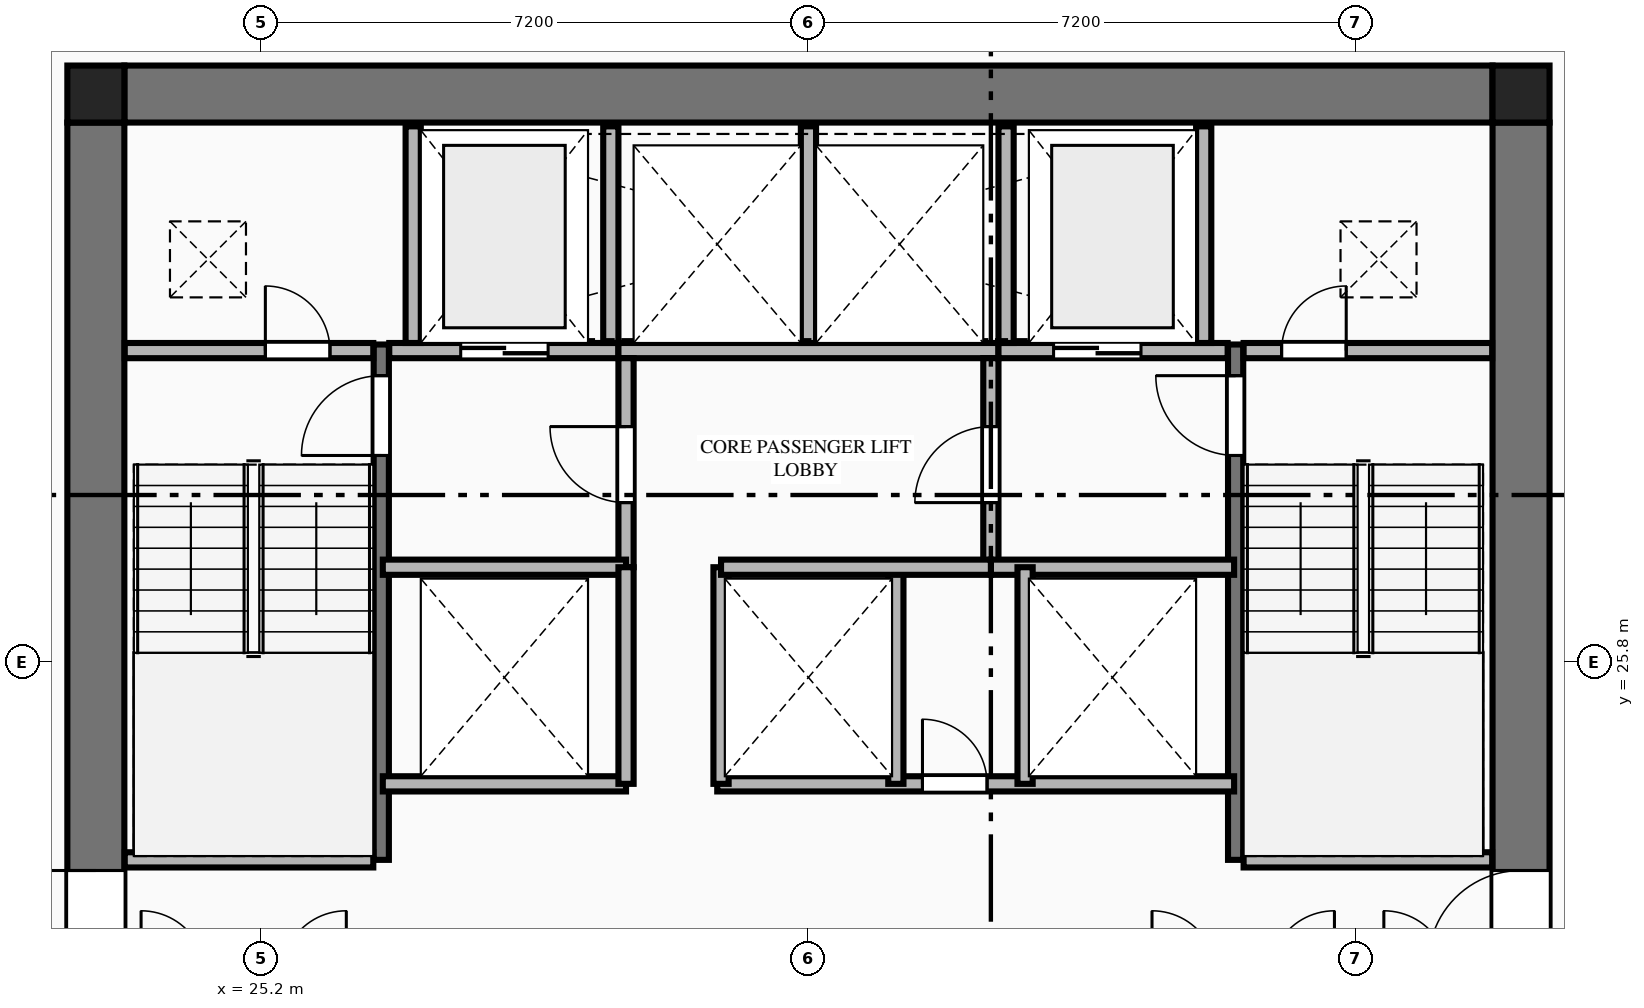
"""IFC4 building model, lengths in metres.
Left out: names, types, materials, properties, quantities, classifications, styles, units other than length and angle.
Written with IfcOpenShell. Run it as: python <this file> out.ifc"""

import sys

from ifc_helpers import new_model, si_unit, direction, frame, frame_2d, origin, origin_2d, place, context, subcontext, project, spatial, rectangle, extrude, element, fill, save


model = new_model("IFC4")
c1 = context("Model", 3, precision=1e-05, world=origin(), true_north=direction((0.0, 1.0)))
c2 = subcontext(c1, "Body", "Model", "MODEL_VIEW")
j1 = project(units=[si_unit("LENGTHUNIT", "METRE"), si_unit("PLANEANGLEUNIT", "RADIAN")], contexts=[c1])
p1 = place(None, origin())
s1 = spatial("IfcSite", under=j1, at=p1, CompositionType="ELEMENT")
p2 = place(p1, origin())
s2 = spatial("IfcBuilding", under=s1, at=p2, CompositionType="ELEMENT")
p3 = place(p2, frame((0.0, 0.0, 90.65)))
s3 = spatial("IfcBuildingStorey", under=s2, at=p3, CompositionType="ELEMENT", Elevation=90.65)
for number, where, z_axis, x_axis in (
    (1, (41.775, 33.275, 0.0), (0.0, 0.0, 1.0), (1.0, 0.0, 0.0)),
    (2, (23.025, 33.275, 0.0), (0.0, 0.0, 1.0), (1.0, 0.0, 0.0)),
):
    element("IfcColumn", number, at=place(p3, frame(where, z_axis=z_axis, x_axis=x_axis)), inside=s3, PredefinedType="COLUMN", context=c2, shape_type="SweptSolid", body=[
        extrude(rectangle(XDim=0.75, YDim=0.75, at=origin_2d()), origin(), (0.0, 0.0, 1.0), 3.55),
    ])
p4 = place(p3, frame((23.4, 33.275, 0.0), z_axis=(0.0, 0.0, 1.0), x_axis=(1.0, 0.0, 0.0)))
e3 = element("IfcWall", 3, at=p4, inside=s3, PredefinedType="SHEAR", context=c2, shape_type="SweptSolid", body=[
    extrude(rectangle(XDim=18.0, YDim=0.75, at=frame_2d((9.0, 0.0))), origin(), (0.0, 0.0, 1.0), 3.33),
])
p5 = place(p3, frame((23.025, 18.9, 0.0), z_axis=(0.0, 0.0, 1.0), x_axis=(0.0, 1.0, 0.0)))
e4 = element("IfcWall", 4, at=p5, inside=s3, PredefinedType="SHEAR", context=c2, shape_type="SweptSolid", body=[
    extrude(rectangle(XDim=14.0, YDim=0.75, at=frame_2d((7.0, 0.0))), origin(), (0.0, 0.0, 1.0), 3.33),
])
p6 = place(p5, frame((2.94, 0.0, 0.0)))
e5 = element("IfcOpeningElement", 5, at=p6, cuts=e4, PredefinedType="OPENING", context=c2, shape_type="SweptSolid", body=[
    extrude(rectangle(XDim=1.22, YDim=2.25, at=frame_2d((0.61, 1.125))), frame((0.0, 0.385, 0.0), z_axis=(0.0, -1.0, 0.0), x_axis=(1.0, 0.0, 0.0)), (0.0, 0.0, 1.0), 0.77),
])
p7 = place(p3, frame((41.775, 18.9, 0.0), z_axis=(0.0, 0.0, 1.0), x_axis=(0.0, 1.0, 0.0)))
e6 = element("IfcWall", 6, at=p7, inside=s3, PredefinedType="SHEAR", context=c2, shape_type="SweptSolid", body=[
    extrude(rectangle(XDim=14.0, YDim=0.75, at=frame_2d((7.0, 0.0))), origin(), (0.0, 0.0, 1.0), 3.33),
])
p8 = place(p7, frame((2.94, 0.0, 0.0)))
e7 = element("IfcOpeningElement", 7, at=p8, cuts=e6, PredefinedType="OPENING", context=c2, shape_type="SweptSolid", body=[
    extrude(rectangle(XDim=1.22, YDim=2.25, at=frame_2d((0.61, 1.125))), frame((0.0, 0.385, 0.0), z_axis=(0.0, -1.0, 0.0), x_axis=(1.0, 0.0, 0.0)), (0.0, 0.0, 1.0), 0.77),
])
p9 = place(p3, frame((26.78, 23.2, 0.0), z_axis=(0.0, 0.0, 1.0), x_axis=(0.0, 1.0, 0.0)))
e8 = element("IfcWall", 8, at=p9, inside=s3, PredefinedType="SHEAR", context=c2, shape_type="SweptSolid", body=[
    extrude(rectangle(XDim=6.78, YDim=0.2, at=frame_2d((3.39, 0.0))), origin(), (0.0, 0.0, 1.0), 3.55),
])
p10 = place(p9, frame((5.32, 0.0, 0.0)))
e9 = element("IfcOpeningElement", 9, at=p10, cuts=e8, PredefinedType="OPENING", context=c2, shape_type="SweptSolid", body=[
    extrude(rectangle(XDim=1.05, YDim=2.15, at=frame_2d((0.525, 1.075))), frame((0.0, 0.11, 0.0), z_axis=(0.0, -1.0, 0.0), x_axis=(1.0, 0.0, 0.0)), (0.0, 0.0, 1.0), 0.22),
])
p11 = place(p3, frame((23.405, 23.2, 0.0), z_axis=(0.0, 0.0, 1.0), x_axis=(1.0, 0.0, 0.0)))
e10 = element("IfcWall", 10, at=p11, inside=s3, PredefinedType="PLUMBINGWALL", context=c2, shape_type="SweptSolid", body=[
    extrude(rectangle(XDim=3.27, YDim=0.2, at=frame_2d((1.635, 0.0))), origin(), (0.0, 0.0, 1.0), 3.33),
])
p12 = place(p3, frame((38.02, 23.2, 0.0), z_axis=(0.0, 0.0, 1.0), x_axis=(0.0, 1.0, 0.0)))
e11 = element("IfcWall", 11, at=p12, inside=s3, PredefinedType="SHEAR", context=c2, shape_type="SweptSolid", body=[
    extrude(rectangle(XDim=6.78, YDim=0.2, at=frame_2d((3.39, 0.0))), origin(), (0.0, 0.0, 1.0), 3.55),
])
p13 = place(p12, frame((5.32, 0.0, 0.0)))
e12 = element("IfcOpeningElement", 12, at=p13, cuts=e11, PredefinedType="OPENING", context=c2, shape_type="SweptSolid", body=[
    extrude(rectangle(XDim=1.05, YDim=2.15, at=frame_2d((0.525, 1.075))), frame((0.0, 0.11, 0.0), z_axis=(0.0, -1.0, 0.0), x_axis=(1.0, 0.0, 0.0)), (0.0, 0.0, 1.0), 0.22),
])
p14 = place(p3, frame((38.125, 23.2, 0.0), z_axis=(0.0, 0.0, 1.0), x_axis=(1.0, 0.0, 0.0)))
e13 = element("IfcWall", 13, at=p14, inside=s3, PredefinedType="PLUMBINGWALL", context=c2, shape_type="SweptSolid", body=[
    extrude(rectangle(XDim=3.27, YDim=0.2, at=frame_2d((1.635, 0.0))), origin(), (0.0, 0.0, 1.0), 3.33),
])
p15 = place(p3, frame((23.405, 29.9, 0.0), z_axis=(0.0, 0.0, 1.0), x_axis=(1.0, 0.0, 0.0)))
e14 = element("IfcWall", 14, at=p15, inside=s3, PredefinedType="PLUMBINGWALL", context=c2, shape_type="SweptSolid", body=[
    extrude(rectangle(XDim=3.27, YDim=0.2, at=frame_2d((1.635, 0.0))), origin(), (0.0, 0.0, 1.0), 3.33),
])
p16 = place(p15, frame((1.85, 0.0, 0.0)))
e15 = element("IfcOpeningElement", 15, at=p16, cuts=e14, PredefinedType="OPENING", context=c2, shape_type="SweptSolid", body=[
    extrude(rectangle(XDim=0.85, YDim=2.05, at=frame_2d((0.425, 1.025))), frame((0.0, 0.11, 0.0), z_axis=(0.0, -1.0, 0.0), x_axis=(1.0, 0.0, 0.0)), (0.0, 0.0, 1.0), 0.22),
])
p17 = place(p3, frame((26.885, 29.9, 0.0), z_axis=(0.0, 0.0, 1.0), x_axis=(1.0, 0.0, 0.0)))
e16 = element("IfcWall", 16, at=p17, inside=s3, PredefinedType="PLUMBINGWALL", context=c2, shape_type="SweptSolid", body=[
    extrude(rectangle(XDim=3.015, YDim=0.2, at=frame_2d((1.507, 0.0))), origin(), (0.0, 0.0, 1.0), 3.33),
])
p18 = place(p17, frame((0.94, 0.0, 0.0)))
e17 = element("IfcOpeningElement", 17, at=p18, cuts=e16, PredefinedType="OPENING", context=c2, shape_type="SweptSolid", body=[
    extrude(rectangle(XDim=1.15, YDim=2.2, at=frame_2d((0.575, 1.1))), frame((0.0, 0.11, 0.0), z_axis=(0.0, -1.0, 0.0), x_axis=(1.0, 0.0, 0.0)), (0.0, 0.0, 1.0), 0.22),
])
p19 = place(p3, frame((29.9, 29.9, 0.0), z_axis=(0.0, 0.0, 1.0), x_axis=(1.0, 0.0, 0.0)))
e18 = element("IfcWall", 18, at=p19, inside=s3, PredefinedType="PLUMBINGWALL", context=c2, shape_type="SweptSolid", body=[
    extrude(rectangle(XDim=5.0, YDim=0.2, at=frame_2d((2.5, 0.0))), origin(), (0.0, 0.0, 1.0), 3.33),
])
p20 = place(p3, frame((34.9, 29.9, 0.0), z_axis=(0.0, 0.0, 1.0), x_axis=(1.0, 0.0, 0.0)))
e19 = element("IfcWall", 19, at=p20, inside=s3, PredefinedType="PLUMBINGWALL", context=c2, shape_type="SweptSolid", body=[
    extrude(rectangle(XDim=3.015, YDim=0.2, at=frame_2d((1.508, 0.0))), origin(), (0.0, 0.0, 1.0), 3.33),
])
p21 = place(p20, frame((0.725, 0.0, 0.0)))
e20 = element("IfcOpeningElement", 20, at=p21, cuts=e19, PredefinedType="OPENING", context=c2, shape_type="SweptSolid", body=[
    extrude(rectangle(XDim=1.15, YDim=2.2, at=frame_2d((0.575, 1.1))), frame((0.0, 0.11, 0.0), z_axis=(0.0, -1.0, 0.0), x_axis=(1.0, 0.0, 0.0)), (0.0, 0.0, 1.0), 0.22),
])
p22 = place(p3, frame((38.125, 29.9, 0.0), z_axis=(0.0, 0.0, 1.0), x_axis=(1.0, 0.0, 0.0)))
e21 = element("IfcWall", 21, at=p22, inside=s3, PredefinedType="PLUMBINGWALL", context=c2, shape_type="SweptSolid", body=[
    extrude(rectangle(XDim=3.27, YDim=0.2, at=frame_2d((1.635, 0.0))), origin(), (0.0, 0.0, 1.0), 3.33),
])
p23 = place(p22, frame((0.5, 0.0, 0.0)))
e22 = element("IfcOpeningElement", 22, at=p23, cuts=e21, PredefinedType="OPENING", context=c2, shape_type="SweptSolid", body=[
    extrude(rectangle(XDim=0.85, YDim=2.05, at=frame_2d((0.425, 1.025))), frame((0.0, 0.11, 0.0), z_axis=(0.0, -1.0, 0.0), x_axis=(1.0, 0.0, 0.0)), (0.0, 0.0, 1.0), 0.22),
])
for number, where, z_axis, x_axis in (
    (23, (27.2, 30.0, 0.0), (0.0, 0.0, 1.0), (0.0, 1.0, 0.0)),
    (24, (29.8, 30.0, 0.0), (0.0, 0.0, 1.0), (0.0, 1.0, 0.0)),
    (25, (32.4, 30.0, 0.0), (0.0, 0.0, 1.0), (0.0, 1.0, 0.0)),
    (26, (35.0, 30.0, 0.0), (0.0, 0.0, 1.0), (0.0, 1.0, 0.0)),
    (27, (37.6, 30.0, 0.0), (0.0, 0.0, 1.0), (0.0, 1.0, 0.0)),
):
    element("IfcWall", number, at=place(p3, frame(where, z_axis=z_axis, x_axis=x_axis)), inside=s3, PredefinedType="PLUMBINGWALL", context=c2, shape_type="SweptSolid", body=[
        extrude(rectangle(XDim=2.85, YDim=0.2, at=frame_2d((1.425, 0.0))), origin(), (0.0, 0.0, 1.0), 3.33),
    ])
p24 = place(p3, frame((30.0, 27.05, 0.0), z_axis=(0.0, 0.0, 1.0), x_axis=(0.0, 1.0, 0.0)))
e28 = element("IfcWall", 28, at=p24, inside=s3, PredefinedType="PLUMBINGWALL", context=c2, shape_type="SweptSolid", body=[
    extrude(rectangle(XDim=2.75, YDim=0.2, at=frame_2d((1.375, 0.0))), origin(), (0.0, 0.0, 1.0), 3.33),
])
p25 = place(p24, frame((0.85, 0.0, 0.0)))
e29 = element("IfcOpeningElement", 29, at=p25, cuts=e28, PredefinedType="OPENING", context=c2, shape_type="SweptSolid", body=[
    extrude(rectangle(XDim=1.0, YDim=2.15, at=frame_2d((0.5, 1.075))), frame((0.0, 0.11, 0.0), z_axis=(0.0, -1.0, 0.0), x_axis=(1.0, 0.0, 0.0)), (0.0, 0.0, 1.0), 0.22),
])
p26 = place(p3, frame((26.8, 27.05, 0.0), z_axis=(0.0, 0.0, 1.0), x_axis=(1.0, 0.0, 0.0)))
e30 = element("IfcWall", 30, at=p26, inside=s3, PredefinedType="PLUMBINGWALL", context=c2, shape_type="SweptSolid", body=[
    extrude(rectangle(XDim=3.2, YDim=0.2, at=frame_2d((1.6, 0.0))), origin(), (0.0, 0.0, 1.0), 3.33),
])
p27 = place(p3, frame((34.8, 27.05, 0.0), z_axis=(0.0, 0.0, 1.0), x_axis=(0.0, 1.0, 0.0)))
e31 = element("IfcWall", 31, at=p27, inside=s3, PredefinedType="PLUMBINGWALL", context=c2, shape_type="SweptSolid", body=[
    extrude(rectangle(XDim=2.75, YDim=0.2, at=frame_2d((1.375, 0.0))), origin(), (0.0, 0.0, 1.0), 3.33),
])
p28 = place(p27, frame((0.85, 0.0, 0.0)))
e32 = element("IfcOpeningElement", 32, at=p28, cuts=e31, PredefinedType="OPENING", context=c2, shape_type="SweptSolid", body=[
    extrude(rectangle(XDim=1.0, YDim=2.15, at=frame_2d((0.5, 1.075))), frame((0.0, 0.11, 0.0), z_axis=(0.0, -1.0, 0.0), x_axis=(1.0, 0.0, 0.0)), (0.0, 0.0, 1.0), 0.22),
])
for number, where, z_axis, x_axis in (
    (33, (34.8, 27.05, 0.0), (0.0, 0.0, 1.0), (1.0, 0.0, 0.0)),
    (34, (26.8, 24.2, 0.0), (0.0, 0.0, 1.0), (1.0, 0.0, 0.0)),
):
    element("IfcWall", number, at=place(p3, frame(where, z_axis=z_axis, x_axis=x_axis)), inside=s3, PredefinedType="PLUMBINGWALL", context=c2, shape_type="SweptSolid", body=[
        extrude(rectangle(XDim=3.2, YDim=0.2, at=frame_2d((1.6, 0.0))), origin(), (0.0, 0.0, 1.0), 3.33),
    ])
p29 = place(p3, frame((30.0, 24.2, 0.0), z_axis=(0.0, 0.0, 1.0), x_axis=(0.0, 1.0, 0.0)))
e35 = element("IfcWall", 35, at=p29, inside=s3, PredefinedType="PLUMBINGWALL", context=c2, shape_type="SweptSolid", body=[
    extrude(rectangle(XDim=2.85, YDim=0.2, at=frame_2d((1.425, 0.0))), origin(), (0.0, 0.0, 1.0), 3.33),
])
p30 = place(p3, frame((31.2, 24.2, 0.0), z_axis=(0.0, 0.0, 1.0), x_axis=(1.0, 0.0, 0.0)))
e36 = element("IfcWall", 36, at=p30, inside=s3, PredefinedType="PLUMBINGWALL", context=c2, shape_type="SweptSolid", body=[
    extrude(rectangle(XDim=6.8, YDim=0.2, at=frame_2d((3.4, 0.0))), origin(), (0.0, 0.0, 1.0), 3.33),
])
p31 = place(p30, frame((2.7, 0.0, 0.0)))
e37 = element("IfcOpeningElement", 37, at=p31, cuts=e36, PredefinedType="OPENING", context=c2, shape_type="SweptSolid", body=[
    extrude(rectangle(XDim=0.85, YDim=2.05, at=frame_2d((0.425, 1.025))), frame((0.0, 0.11, 0.0), z_axis=(0.0, -1.0, 0.0), x_axis=(1.0, 0.0, 0.0)), (0.0, 0.0, 1.0), 0.22),
])
for number, where, z_axis, x_axis in (
    (38, (31.25, 24.2, 0.0), (0.0, 0.0, 1.0), (0.0, 1.0, 0.0)),
    (39, (33.55, 24.2, 0.0), (0.0, 0.0, 1.0), (0.0, 1.0, 0.0)),
    (40, (35.25, 24.2, 0.0), (0.0, 0.0, 1.0), (0.0, 1.0, 0.0)),
):
    element("IfcWall", number, at=place(p3, frame(where, z_axis=z_axis, x_axis=x_axis)), inside=s3, PredefinedType="PLUMBINGWALL", context=c2, shape_type="SweptSolid", body=[
        extrude(rectangle(XDim=2.85, YDim=0.2, at=frame_2d((1.425, 0.0))), origin(), (0.0, 0.0, 1.0), 3.33),
    ])
p32 = place(p3, frame((31.25, 27.05, 0.0), z_axis=(0.0, 0.0, 1.0), x_axis=(1.0, 0.0, 0.0)))
e41 = element("IfcWall", 41, at=p32, inside=s3, PredefinedType="PLUMBINGWALL", context=c2, shape_type="SweptSolid", body=[
    extrude(rectangle(XDim=3.55, YDim=0.2, at=frame_2d((1.775, 0.0))), origin(), (0.0, 0.0, 1.0), 3.33),
])
p33 = place(p6, origin())
e42 = element("IfcDoor", 42, at=p33, inside=s3, OperationType="SINGLE_SWING_RIGHT", PredefinedType="DOOR", context=c2, shape_type="SweptSolid", body=[
    extrude(rectangle(XDim=1.22, YDim=2.25, at=frame_2d((0.61, 1.125))), frame((0.0, 0.025, 0.0), z_axis=(0.0, -1.0, 0.0), x_axis=(1.0, 0.0, 0.0)), (0.0, 0.0, 1.0), 0.05),
])
fill(e5, e42)
p34 = place(p8, origin())
e43 = element("IfcDoor", 43, at=p34, inside=s3, OperationType="SINGLE_SWING_LEFT", PredefinedType="DOOR", context=c2, shape_type="SweptSolid", body=[
    extrude(rectangle(XDim=1.22, YDim=2.25, at=frame_2d((0.61, 1.125))), frame((0.0, 0.025, 0.0), z_axis=(0.0, -1.0, 0.0), x_axis=(1.0, 0.0, 0.0)), (0.0, 0.0, 1.0), 0.05),
])
fill(e7, e43)
p35 = place(p10, origin())
e44 = element("IfcDoor", 44, at=p35, inside=s3, OperationType="SINGLE_SWING_LEFT", PredefinedType="DOOR", context=c2, shape_type="SweptSolid", body=[
    extrude(rectangle(XDim=1.05, YDim=2.15, at=frame_2d((0.525, 1.075))), frame((0.0, 0.025, 0.0), z_axis=(0.0, -1.0, 0.0), x_axis=(1.0, 0.0, 0.0)), (0.0, 0.0, 1.0), 0.05),
])
fill(e9, e44)
p36 = place(p13, origin())
e45 = element("IfcDoor", 45, at=p36, inside=s3, OperationType="SINGLE_SWING_RIGHT", PredefinedType="DOOR", context=c2, shape_type="SweptSolid", body=[
    extrude(rectangle(XDim=1.05, YDim=2.15, at=frame_2d((0.525, 1.075))), frame((0.0, 0.025, 0.0), z_axis=(0.0, -1.0, 0.0), x_axis=(1.0, 0.0, 0.0)), (0.0, 0.0, 1.0), 0.05),
])
fill(e12, e45)
p37 = place(p16, origin())
e46 = element("IfcDoor", 46, at=p37, inside=s3, OperationType="SINGLE_SWING_LEFT", PredefinedType="DOOR", context=c2, shape_type="SweptSolid", body=[
    extrude(rectangle(XDim=0.85, YDim=2.05, at=frame_2d((0.425, 1.025))), frame((0.0, 0.025, 0.0), z_axis=(0.0, -1.0, 0.0), x_axis=(1.0, 0.0, 0.0)), (0.0, 0.0, 1.0), 0.05),
])
fill(e15, e46)
p38 = place(p23, origin())
e47 = element("IfcDoor", 47, at=p38, inside=s3, OperationType="SINGLE_SWING_RIGHT", PredefinedType="DOOR", context=c2, shape_type="SweptSolid", body=[
    extrude(rectangle(XDim=0.85, YDim=2.05, at=frame_2d((0.425, 1.025))), frame((0.0, 0.025, 0.0), z_axis=(0.0, -1.0, 0.0), x_axis=(1.0, 0.0, 0.0)), (0.0, 0.0, 1.0), 0.05),
])
fill(e22, e47)
p39 = place(p18, origin())
e48 = element("IfcDoor", 48, at=p39, inside=s3, OperationType="DOUBLE_DOOR_SLIDING", PredefinedType="DOOR", context=c2, shape_type="SweptSolid", body=[
    extrude(rectangle(XDim=1.15, YDim=2.2, at=frame_2d((0.575, 1.1))), frame((0.0, 0.025, 0.0), z_axis=(0.0, -1.0, 0.0), x_axis=(1.0, 0.0, 0.0)), (0.0, 0.0, 1.0), 0.05),
])
fill(e17, e48)
p40 = place(p21, origin())
e49 = element("IfcDoor", 49, at=p40, inside=s3, OperationType="DOUBLE_DOOR_SLIDING", PredefinedType="DOOR", context=c2, shape_type="SweptSolid", body=[
    extrude(rectangle(XDim=1.15, YDim=2.2, at=frame_2d((0.575, 1.1))), frame((0.0, 0.025, 0.0), z_axis=(0.0, -1.0, 0.0), x_axis=(1.0, 0.0, 0.0)), (0.0, 0.0, 1.0), 0.05),
])
fill(e20, e49)
p41 = place(p25, origin())
e50 = element("IfcDoor", 50, at=p41, inside=s3, OperationType="SINGLE_SWING_RIGHT", PredefinedType="DOOR", context=c2, shape_type="SweptSolid", body=[
    extrude(rectangle(XDim=1.0, YDim=2.15, at=frame_2d((0.5, 1.075))), frame((0.0, 0.025, 0.0), z_axis=(0.0, -1.0, 0.0), x_axis=(1.0, 0.0, 0.0)), (0.0, 0.0, 1.0), 0.05),
])
fill(e29, e50)
p42 = place(p28, origin())
e51 = element("IfcDoor", 51, at=p42, inside=s3, OperationType="SINGLE_SWING_LEFT", PredefinedType="DOOR", context=c2, shape_type="SweptSolid", body=[
    extrude(rectangle(XDim=1.0, YDim=2.15, at=frame_2d((0.5, 1.075))), frame((0.0, 0.025, 0.0), z_axis=(0.0, -1.0, 0.0), x_axis=(1.0, 0.0, 0.0)), (0.0, 0.0, 1.0), 0.05),
])
fill(e32, e51)
p43 = place(p31, origin())
e52 = element("IfcDoor", 52, at=p43, inside=s3, OperationType="SINGLE_SWING_LEFT", PredefinedType="DOOR", context=c2, shape_type="SweptSolid", body=[
    extrude(rectangle(XDim=0.85, YDim=2.05, at=frame_2d((0.425, 1.025))), frame((0.0, 0.025, 0.0), z_axis=(0.0, -1.0, 0.0), x_axis=(1.0, 0.0, 0.0)), (0.0, 0.0, 1.0), 0.05),
])
fill(e37, e52)
save(model, sys.argv[1])
